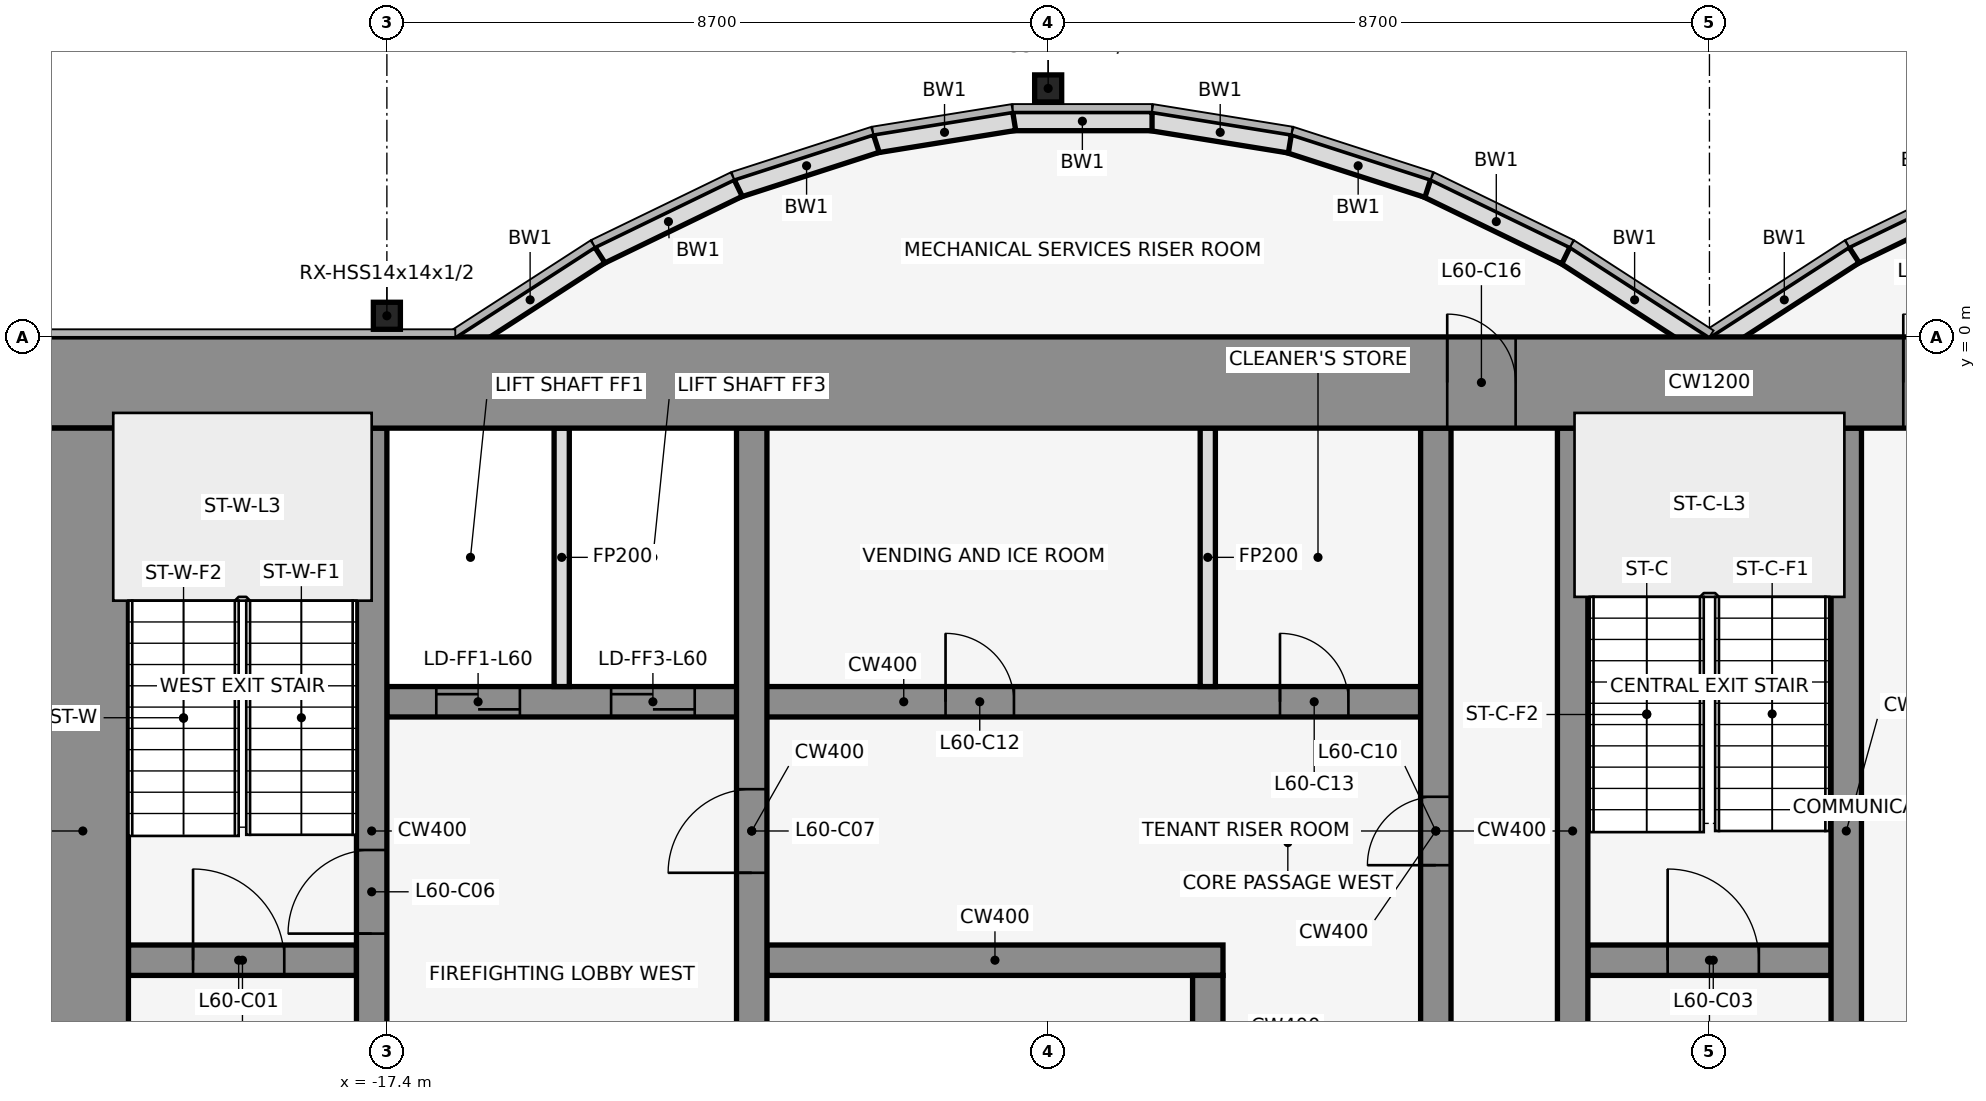
"""IFC4 building model, lengths in metres.
Left out: names, types, materials, properties, quantities, classifications, styles, units other than length and angle.
Written with IfcOpenShell. Run it as: python <this file> out.ifc"""

import sys

from ifc_helpers import new_model, si_unit, direction, frame, frame_2d, origin, origin_2d, place, context, subcontext, project, spatial, rectangle, hollow_rectangle, extrude, element, fill, save


model = new_model("IFC4")
c1 = context("Model", 3, precision=1e-05, world=origin(), true_north=direction((0.0, 1.0)))
c2 = subcontext(c1, "Body", "Model", "MODEL_VIEW")
j1 = project(units=[si_unit("LENGTHUNIT", "METRE"), si_unit("PLANEANGLEUNIT", "RADIAN")], contexts=[c1])
p1 = place(None, origin())
s1 = spatial("IfcSite", under=j1, at=p1, CompositionType="ELEMENT")
p2 = place(p1, origin())
s2 = spatial("IfcBuilding", under=s1, at=p2, CompositionType="ELEMENT")
p3 = place(p2, frame((0.0, 0.0, 266.6)))
s3 = spatial("IfcBuildingStorey", under=s2, at=p3, CompositionType="ELEMENT", Elevation=266.6)
for number, where, z_axis, x_axis in (
    (1, (-8.7, 3.269, 0.0), (0.0, 0.0, 1.0), (1.0, 0.0, 0.0)),
    (2, (-17.4, 0.278, 0.0), (0.0, 0.0, 1.0), (1.0, 0.0, 0.0)),
):
    element("IfcColumn", number, at=place(p3, frame(where, z_axis=z_axis, x_axis=x_axis)), inside=s3, PredefinedType="COLUMN", context=c2, shape_type="SweptSolid", body=[
        extrude(hollow_rectangle(XDim=0.356, YDim=0.356, WallThickness=0.012, at=origin_2d()), origin(), (0.0, 0.0, 1.0), 4.2),
    ])
p4 = place(p3, frame((3.721, 1.962, 0.0), z_axis=(0.0, 0.0, 1.0), x_axis=(-0.89982408427, -0.436252928206, 0.0)))
e3 = element("IfcWall", 3, at=p4, inside=s3, PredefinedType="STANDARD", context=c2, shape_type="SweptSolid", body=[
    extrude(rectangle(XDim=2.038, YDim=0.25, at=frame_2d((1.019, 0.0))), origin(), (0.0, 0.0, 1.0), 4.05),
])
for number, where, z_axis, x_axis in (
    (4, (1.901, 1.08, 0.0), (0.0, 0.0, 1.0), (-0.84, -0.543, 0.0)),
    (5, (-0.068, -0.105, 0.0), (0.0, 0.0, 1.0), (-0.84, 0.543, 0.0)),
):
    element("IfcWall", number, at=place(p3, frame(where, z_axis=z_axis, x_axis=x_axis)), inside=s3, PredefinedType="STANDARD", context=c2, shape_type="SweptSolid", body=[
        extrude(rectangle(XDim=2.183, YDim=0.25, at=frame_2d((1.091, 0.0))), origin(), (0.0, 0.0, 1.0), 4.05),
    ])
p5 = place(p3, frame((-1.888, 1.073, 0.0), z_axis=(0.0, 0.0, 1.0), x_axis=(-0.89982408427, 0.436252928206, 0.0)))
e6 = element("IfcWall", 6, at=p5, inside=s3, PredefinedType="STANDARD", context=c2, shape_type="SweptSolid", body=[
    extrude(rectangle(XDim=2.038, YDim=0.25, at=frame_2d((1.019, 0.0))), origin(), (0.0, 0.0, 1.0), 4.05),
])
p6 = place(p3, frame((-3.705, 1.955, 0.0), z_axis=(0.0, 0.0, 1.0), x_axis=(-0.951495806175, 0.307661714928, 0.0)))
e7 = element("IfcWall", 7, at=p6, inside=s3, PredefinedType="STANDARD", context=c2, shape_type="SweptSolid", body=[
    extrude(rectangle(XDim=1.927, YDim=0.25, at=frame_2d((0.963, 0.0))), origin(), (0.0, 0.0, 1.0), 4.05),
])
p7 = place(p3, frame((-5.52, 2.543, 0.0), z_axis=(0.0, 0.0, 1.0), x_axis=(-0.987181718931, 0.159600293885, 0.0)))
e8 = element("IfcWall", 8, at=p7, inside=s3, PredefinedType="STANDARD", context=c2, shape_type="SweptSolid", body=[
    extrude(rectangle(XDim=1.857, YDim=0.25, at=frame_2d((0.929, 0.0))), origin(), (0.0, 0.0, 1.0), 4.05),
])
p8 = place(p3, frame((-7.333, 2.838, 0.0), z_axis=(0.0, 0.0, 1.0), x_axis=(-1.0, 0.0, 0.0)))
e9 = element("IfcWall", 9, at=p8, inside=s3, PredefinedType="STANDARD", context=c2, shape_type="SweptSolid", body=[
    extrude(rectangle(XDim=1.833, YDim=0.25, at=frame_2d((0.917, 0.0))), origin(), (0.0, 0.0, 1.0), 4.05),
])
p9 = place(p3, frame((-9.147, 2.84, 0.0), z_axis=(0.0, 0.0, 1.0), x_axis=(-0.987181718931, -0.159600293885, 0.0)))
e10 = element("IfcWall", 10, at=p9, inside=s3, PredefinedType="STANDARD", context=c2, shape_type="SweptSolid", body=[
    extrude(rectangle(XDim=1.857, YDim=0.25, at=frame_2d((0.929, 0.0))), origin(), (0.0, 0.0, 1.0), 4.05),
])
p10 = place(p3, frame((-10.962, 2.548, 0.0), z_axis=(0.0, 0.0, 1.0), x_axis=(-0.951495806175, -0.307661714928, 0.0)))
e11 = element("IfcWall", 11, at=p10, inside=s3, PredefinedType="STANDARD", context=c2, shape_type="SweptSolid", body=[
    extrude(rectangle(XDim=1.927, YDim=0.25, at=frame_2d((0.963, 0.0))), origin(), (0.0, 0.0, 1.0), 4.05),
])
p11 = place(p3, frame((-12.779, 1.962, 0.0), z_axis=(0.0, 0.0, 1.0), x_axis=(-0.89982408427, -0.436252928206, 0.0)))
e12 = element("IfcWall", 12, at=p11, inside=s3, PredefinedType="STANDARD", context=c2, shape_type="SweptSolid", body=[
    extrude(rectangle(XDim=2.038, YDim=0.25, at=frame_2d((1.019, 0.0))), origin(), (0.0, 0.0, 1.0), 4.05),
])
p12 = place(p3, frame((-14.599, 1.08, 0.0), z_axis=(0.0, 0.0, 1.0), x_axis=(-0.83981312244, -0.542875602121, 0.0)))
e13 = element("IfcWall", 13, at=p12, inside=s3, PredefinedType="STANDARD", context=c2, shape_type="SweptSolid", body=[
    extrude(rectangle(XDim=2.183, YDim=0.25, at=frame_2d((1.091, 0.0))), origin(), (0.0, 0.0, 1.0), 4.05),
])
p13 = place(p3, frame((-20.8, -8.2, 0.0), z_axis=(0.0, 0.0, 1.0), x_axis=(1.0, 0.0, 0.0)))
e14 = element("IfcWall", 14, at=p13, inside=s3, PredefinedType="SHEAR", context=c2, shape_type="SweptSolid", body=[
    extrude(rectangle(XDim=3.0, YDim=0.4, at=frame_2d((1.5, 0.0))), origin(), (0.0, 0.0, 1.0), 4.2),
])
p14 = place(p13, frame((0.85, 0.0, 0.0)))
e15 = element("IfcOpeningElement", 15, at=p14, cuts=e14, PredefinedType="OPENING", context=c2, shape_type="SweptSolid", body=[
    extrude(rectangle(XDim=1.2, YDim=2.1, at=frame_2d((0.6, 1.05))), frame((0.0, 0.212, 0.0), z_axis=(0.0, -1.0, 0.0), x_axis=(1.0, 0.0, 0.0)), (0.0, 0.0, 1.0), 0.424),
])
p15 = place(p3, frame((-12.4, -8.2, 0.0), z_axis=(0.0, 0.0, 1.0), x_axis=(1.0, 0.0, 0.0)))
e16 = element("IfcWall", 16, at=p15, inside=s3, PredefinedType="SHEAR", context=c2, shape_type="SweptSolid", body=[
    extrude(rectangle(XDim=6.0, YDim=0.4, at=frame_2d((3.0, 0.0))), origin(), (0.0, 0.0, 1.0), 4.2),
])
p16 = place(p3, frame((-1.6, -8.2, 0.0), z_axis=(0.0, 0.0, 1.0), x_axis=(1.0, 0.0, 0.0)))
e17 = element("IfcWall", 17, at=p16, inside=s3, PredefinedType="SHEAR", context=c2, shape_type="SweptSolid", body=[
    extrude(rectangle(XDim=3.2, YDim=0.4, at=frame_2d((1.6, 0.0))), origin(), (0.0, 0.0, 1.0), 4.2),
])
p17 = place(p16, frame((1.05, 0.0, 0.0)))
e18 = element("IfcOpeningElement", 18, at=p17, cuts=e17, PredefinedType="OPENING", context=c2, shape_type="SweptSolid", body=[
    extrude(rectangle(XDim=1.2, YDim=2.1, at=frame_2d((0.6, 1.05))), frame((0.0, 0.212, 0.0), z_axis=(0.0, -1.0, 0.0), x_axis=(1.0, 0.0, 0.0)), (0.0, 0.0, 1.0), 0.424),
])
p18 = place(p3, frame((-17.4, -4.8, 0.0), z_axis=(0.0, 0.0, 1.0), x_axis=(1.0, 0.0, 0.0)))
e19 = element("IfcWall", 19, at=p18, inside=s3, PredefinedType="SHEAR", context=c2, shape_type="SweptSolid", body=[
    extrude(rectangle(XDim=13.6, YDim=0.4, at=frame_2d((6.8, 0.0))), origin(), (0.0, 0.0, 1.0), 4.2),
])
p19 = place(p18, frame((0.65, 0.0, 0.0)))
e20 = element("IfcOpeningElement", 20, at=p19, cuts=e19, PredefinedType="OPENING", context=c2, shape_type="SweptSolid", body=[
    extrude(rectangle(XDim=1.1, YDim=2.1, at=frame_2d((0.55, 1.05))), frame((0.0, 0.212, 0.0), z_axis=(0.0, -1.0, 0.0), x_axis=(1.0, 0.0, 0.0)), (0.0, 0.0, 1.0), 0.424),
])
p20 = place(p18, frame((2.95, 0.0, 0.0)))
e21 = element("IfcOpeningElement", 21, at=p20, cuts=e19, PredefinedType="OPENING", context=c2, shape_type="SweptSolid", body=[
    extrude(rectangle(XDim=1.1, YDim=2.1, at=frame_2d((0.55, 1.05))), frame((0.0, 0.212, 0.0), z_axis=(0.0, -1.0, 0.0), x_axis=(1.0, 0.0, 0.0)), (0.0, 0.0, 1.0), 0.424),
])
p21 = place(p18, frame((7.35, 0.0, 0.0)))
e22 = element("IfcOpeningElement", 22, at=p21, cuts=e19, PredefinedType="OPENING", context=c2, shape_type="SweptSolid", body=[
    extrude(rectangle(XDim=0.9, YDim=2.1, at=frame_2d((0.45, 1.05))), frame((0.0, 0.212, 0.0), z_axis=(0.0, -1.0, 0.0), x_axis=(1.0, 0.0, 0.0)), (0.0, 0.0, 1.0), 0.424),
])
p22 = place(p18, frame((11.75, 0.0, 0.0)))
e23 = element("IfcOpeningElement", 23, at=p22, cuts=e19, PredefinedType="OPENING", context=c2, shape_type="SweptSolid", body=[
    extrude(rectangle(XDim=0.9, YDim=2.1, at=frame_2d((0.45, 1.05))), frame((0.0, 0.212, 0.0), z_axis=(0.0, -1.0, 0.0), x_axis=(1.0, 0.0, 0.0)), (0.0, 0.0, 1.0), 0.424),
])
p23 = place(p3, frame((-17.6, -11.8, 0.0), z_axis=(0.0, 0.0, 1.0), x_axis=(0.0, 1.0, 0.0)))
e24 = element("IfcWall", 24, at=p23, inside=s3, PredefinedType="SHEAR", context=c2, shape_type="SweptSolid", body=[
    extrude(rectangle(XDim=10.6, YDim=0.4, at=frame_2d((5.3, 0.0))), origin(), (0.0, 0.0, 1.0), 4.2),
])
p24 = place(p23, frame((1.25, 0.0, 0.0)))
e25 = element("IfcOpeningElement", 25, at=p24, cuts=e24, PredefinedType="OPENING", context=c2, shape_type="SweptSolid", body=[
    extrude(rectangle(XDim=1.1, YDim=2.1, at=frame_2d((0.55, 1.05))), frame((0.0, 0.212, 0.0), z_axis=(0.0, -1.0, 0.0), x_axis=(1.0, 0.0, 0.0)), (0.0, 0.0, 1.0), 0.424),
])
p25 = place(p23, frame((3.95, 0.0, 0.0)))
e26 = element("IfcOpeningElement", 26, at=p25, cuts=e24, PredefinedType="OPENING", context=c2, shape_type="SweptSolid", body=[
    extrude(rectangle(XDim=1.1, YDim=2.1, at=frame_2d((0.55, 1.05))), frame((0.0, 0.212, 0.0), z_axis=(0.0, -1.0, 0.0), x_axis=(1.0, 0.0, 0.0)), (0.0, 0.0, 1.0), 0.424),
])
p26 = place(p3, frame((-15.1, -4.6, 0.0), z_axis=(0.0, 0.0, 1.0), x_axis=(0.0, 1.0, 0.0)))
e27 = element("IfcWall", 27, at=p26, inside=s3, PredefinedType="PARTITIONING", context=c2, shape_type="SweptSolid", body=[
    extrude(rectangle(XDim=3.4, YDim=0.2, at=frame_2d((1.7, 0.0))), origin(), (0.0, 0.0, 1.0), 3.118),
])
p27 = place(p3, frame((-12.6, -11.8, 0.0), z_axis=(0.0, 0.0, 1.0), x_axis=(0.0, 1.0, 0.0)))
e28 = element("IfcWall", 28, at=p27, inside=s3, PredefinedType="SHEAR", context=c2, shape_type="SweptSolid", body=[
    extrude(rectangle(XDim=10.6, YDim=0.4, at=frame_2d((5.3, 0.0))), origin(), (0.0, 0.0, 1.0), 4.2),
])
p28 = place(p27, frame((4.75, 0.0, 0.0)))
e29 = element("IfcOpeningElement", 29, at=p28, cuts=e28, PredefinedType="OPENING", context=c2, shape_type="SweptSolid", body=[
    extrude(rectangle(XDim=1.1, YDim=2.1, at=frame_2d((0.55, 1.05))), frame((0.0, 0.212, 0.0), z_axis=(0.0, -1.0, 0.0), x_axis=(1.0, 0.0, 0.0)), (0.0, 0.0, 1.0), 0.424),
])
p29 = place(p3, frame((-6.6, -11.8, 0.0), z_axis=(0.0, 0.0, 1.0), x_axis=(0.0, 1.0, 0.0)))
e30 = element("IfcWall", 30, at=p29, inside=s3, PredefinedType="SHEAR", context=c2, shape_type="SweptSolid", body=[
    extrude(rectangle(XDim=3.4, YDim=0.4, at=frame_2d((1.7, 0.0))), origin(), (0.0, 0.0, 1.0), 4.2),
])
p30 = place(p29, frame((1.25, 0.0, 0.0)))
e31 = element("IfcOpeningElement", 31, at=p30, cuts=e30, PredefinedType="OPENING", context=c2, shape_type="SweptSolid", body=[
    extrude(rectangle(XDim=0.9, YDim=2.1, at=frame_2d((0.45, 1.05))), frame((0.0, 0.212, 0.0), z_axis=(0.0, -1.0, 0.0), x_axis=(1.0, 0.0, 0.0)), (0.0, 0.0, 1.0), 0.424),
])
p31 = place(p3, frame((-6.6, -4.6, 0.0), z_axis=(0.0, 0.0, 1.0), x_axis=(0.0, 1.0, 0.0)))
e32 = element("IfcWall", 32, at=p31, inside=s3, PredefinedType="PARTITIONING", context=c2, shape_type="SweptSolid", body=[
    extrude(rectangle(XDim=3.4, YDim=0.2, at=frame_2d((1.7, 0.0))), origin(), (0.0, 0.0, 1.0), 3.118),
])
p32 = place(p3, frame((-3.6, -11.8, 0.0), z_axis=(0.0, 0.0, 1.0), x_axis=(0.0, 1.0, 0.0)))
e33 = element("IfcWall", 33, at=p32, inside=s3, PredefinedType="SHEAR", context=c2, shape_type="SweptSolid", body=[
    extrude(rectangle(XDim=10.6, YDim=0.4, at=frame_2d((5.3, 0.0))), origin(), (0.0, 0.0, 1.0), 4.2),
])
p33 = place(p32, frame((4.85, 0.0, 0.0)))
e34 = element("IfcOpeningElement", 34, at=p33, cuts=e33, PredefinedType="OPENING", context=c2, shape_type="SweptSolid", body=[
    extrude(rectangle(XDim=0.9, YDim=2.1, at=frame_2d((0.45, 1.05))), frame((0.0, 0.212, 0.0), z_axis=(0.0, -1.0, 0.0), x_axis=(1.0, 0.0, 0.0)), (0.0, 0.0, 1.0), 0.424),
])
for number, where, z_axis, x_axis in (
    (35, (-1.8, -11.8, 0.0), (0.0, 0.0, 1.0), (0.0, 1.0, 0.0)),
    (36, (1.8, -11.8, 0.0), (0.0, 0.0, 1.0), (0.0, 1.0, 0.0)),
):
    element("IfcWall", number, at=place(p3, frame(where, z_axis=z_axis, x_axis=x_axis)), inside=s3, PredefinedType="SHEAR", context=c2, shape_type="SweptSolid", body=[
        extrude(rectangle(XDim=10.6, YDim=0.4, at=frame_2d((5.3, 0.0))), origin(), (0.0, 0.0, 1.0), 4.2),
    ])
p34 = place(p3, frame((-22.0, -0.6, 0.0), z_axis=(0.0, 0.0, 1.0), x_axis=(1.0, 0.0, 0.0)))
e37 = element("IfcWall", 37, at=p34, inside=s3, PredefinedType="SHEAR", context=c2, shape_type="SweptSolid", body=[
    extrude(rectangle(XDim=44.0, YDim=1.2, at=frame_2d((22.0, 0.0))), origin(), (0.0, 0.0, 1.0), 4.2),
])
p35 = place(p34, frame((18.55, 0.0, 0.0)))
e38 = element("IfcOpeningElement", 38, at=p35, cuts=e37, PredefinedType="OPENING", context=c2, shape_type="SweptSolid", body=[
    extrude(rectangle(XDim=0.9, YDim=2.1, at=frame_2d((0.45, 1.05))), frame((0.0, 0.612, 0.0), z_axis=(0.0, -1.0, 0.0), x_axis=(1.0, 0.0, 0.0)), (0.0, 0.0, 1.0), 1.224),
])
p36 = place(p34, frame((24.55, 0.0, 0.0)))
e39 = element("IfcOpeningElement", 39, at=p36, cuts=e37, PredefinedType="OPENING", context=c2, shape_type="SweptSolid", body=[
    extrude(rectangle(XDim=0.9, YDim=2.1, at=frame_2d((0.45, 1.05))), frame((0.0, 0.612, 0.0), z_axis=(0.0, -1.0, 0.0), x_axis=(1.0, 0.0, 0.0)), (0.0, 0.0, 1.0), 1.224),
])
p37 = place(p3, frame((-21.4, -11.8, 0.0), z_axis=(0.0, 0.0, 1.0), x_axis=(0.0, 1.0, 0.0)))
e40 = element("IfcWall", 40, at=p37, inside=s3, PredefinedType="SHEAR", context=c2, shape_type="SweptSolid", body=[
    extrude(rectangle(XDim=10.6, YDim=1.2, at=frame_2d((5.3, 0.0))), origin(), (0.0, 0.0, 1.0), 4.2),
])
p38 = place(p14, origin())
e41 = element("IfcDoor", 41, at=p38, inside=s3, OperationType="SINGLE_SWING_LEFT", PredefinedType="DOOR", context=c2, shape_type="SweptSolid", body=[
    extrude(rectangle(XDim=1.2, YDim=2.1, at=frame_2d((0.6, 1.05))), frame((0.0, 0.025, 0.0), z_axis=(0.0, -1.0, 0.0), x_axis=(1.0, 0.0, 0.0)), (0.0, 0.0, 1.0), 0.05),
])
fill(e15, e41)
p39 = place(p17, origin())
e42 = element("IfcDoor", 42, at=p39, inside=s3, OperationType="SINGLE_SWING_LEFT", PredefinedType="DOOR", context=c2, shape_type="SweptSolid", body=[
    extrude(rectangle(XDim=1.2, YDim=2.1, at=frame_2d((0.6, 1.05))), frame((0.0, 0.025, 0.0), z_axis=(0.0, -1.0, 0.0), x_axis=(1.0, 0.0, 0.0)), (0.0, 0.0, 1.0), 0.05),
])
fill(e18, e42)
p40 = place(p19, origin())
e43 = element("IfcDoor", 43, at=p40, inside=s3, OperationType="DOUBLE_DOOR_SLIDING", PredefinedType="DOOR", context=c2, shape_type="SweptSolid", body=[
    extrude(rectangle(XDim=1.1, YDim=2.1, at=frame_2d((0.55, 1.05))), frame((0.0, 0.025, 0.0), z_axis=(0.0, -1.0, 0.0), x_axis=(1.0, 0.0, 0.0)), (0.0, 0.0, 1.0), 0.05),
])
fill(e20, e43)
p41 = place(p20, origin())
e44 = element("IfcDoor", 44, at=p41, inside=s3, OperationType="DOUBLE_DOOR_SLIDING", PredefinedType="DOOR", context=c2, shape_type="SweptSolid", body=[
    extrude(rectangle(XDim=1.1, YDim=2.1, at=frame_2d((0.55, 1.05))), frame((0.0, 0.025, 0.0), z_axis=(0.0, -1.0, 0.0), x_axis=(1.0, 0.0, 0.0)), (0.0, 0.0, 1.0), 0.05),
])
fill(e21, e44)
p42 = place(p25, frame((1.1, 0.0, 0.0), z_axis=(0.0, 0.0, 1.0), x_axis=(-1.0, 0.0, 0.0)))
e45 = element("IfcDoor", 45, at=p42, inside=s3, OperationType="SINGLE_SWING_LEFT", PredefinedType="DOOR", context=c2, shape_type="SweptSolid", body=[
    extrude(rectangle(XDim=1.1, YDim=2.1, at=frame_2d((0.55, 1.05))), frame((0.0, 0.025, 0.0), z_axis=(0.0, -1.0, 0.0), x_axis=(1.0, 0.0, 0.0)), (0.0, 0.0, 1.0), 0.05),
])
fill(e26, e45)
p43 = place(p28, origin())
e46 = element("IfcDoor", 46, at=p43, inside=s3, OperationType="SINGLE_SWING_LEFT", PredefinedType="DOOR", context=c2, shape_type="SweptSolid", body=[
    extrude(rectangle(XDim=1.1, YDim=2.1, at=frame_2d((0.55, 1.05))), frame((0.0, 0.025, 0.0), z_axis=(0.0, -1.0, 0.0), x_axis=(1.0, 0.0, 0.0)), (0.0, 0.0, 1.0), 0.05),
])
fill(e29, e46)
p44 = place(p33, frame((0.9, 0.0, 0.0), z_axis=(0.0, 0.0, 1.0), x_axis=(-1.0, 0.0, 0.0)))
e47 = element("IfcDoor", 47, at=p44, inside=s3, OperationType="SINGLE_SWING_LEFT", PredefinedType="DOOR", context=c2, shape_type="SweptSolid", body=[
    extrude(rectangle(XDim=0.9, YDim=2.1, at=frame_2d((0.45, 1.05))), frame((0.0, 0.025, 0.0), z_axis=(0.0, -1.0, 0.0), x_axis=(1.0, 0.0, 0.0)), (0.0, 0.0, 1.0), 0.05),
])
fill(e34, e47)
p45 = place(p21, origin())
e48 = element("IfcDoor", 48, at=p45, inside=s3, OperationType="SINGLE_SWING_RIGHT", PredefinedType="DOOR", context=c2, shape_type="SweptSolid", body=[
    extrude(rectangle(XDim=0.9, YDim=2.1, at=frame_2d((0.45, 1.05))), frame((0.0, 0.025, 0.0), z_axis=(0.0, -1.0, 0.0), x_axis=(1.0, 0.0, 0.0)), (0.0, 0.0, 1.0), 0.05),
])
fill(e22, e48)
p46 = place(p22, origin())
e49 = element("IfcDoor", 49, at=p46, inside=s3, OperationType="SINGLE_SWING_LEFT", PredefinedType="DOOR", context=c2, shape_type="SweptSolid", body=[
    extrude(rectangle(XDim=0.9, YDim=2.1, at=frame_2d((0.45, 1.05))), frame((0.0, 0.025, 0.0), z_axis=(0.0, -1.0, 0.0), x_axis=(1.0, 0.0, 0.0)), (0.0, 0.0, 1.0), 0.05),
])
fill(e23, e49)
p47 = place(p35, origin())
e50 = element("IfcDoor", 50, at=p47, inside=s3, OperationType="SINGLE_SWING_LEFT", PredefinedType="DOOR", context=c2, shape_type="SweptSolid", body=[
    extrude(rectangle(XDim=0.9, YDim=2.1, at=frame_2d((0.45, 1.05))), frame((0.0, 0.025, 0.0), z_axis=(0.0, -1.0, 0.0), x_axis=(1.0, 0.0, 0.0)), (0.0, 0.0, 1.0), 0.05),
])
fill(e38, e50)
p48 = place(p36, origin())
e51 = element("IfcDoor", 51, at=p48, inside=s3, OperationType="SINGLE_SWING_LEFT", PredefinedType="DOOR", context=c2, shape_type="SweptSolid", body=[
    extrude(rectangle(XDim=0.9, YDim=2.1, at=frame_2d((0.45, 1.05))), frame((0.0, 0.025, 0.0), z_axis=(0.0, -1.0, 0.0), x_axis=(1.0, 0.0, 0.0)), (0.0, 0.0, 1.0), 0.05),
])
fill(e39, e51)
save(model, sys.argv[1])
